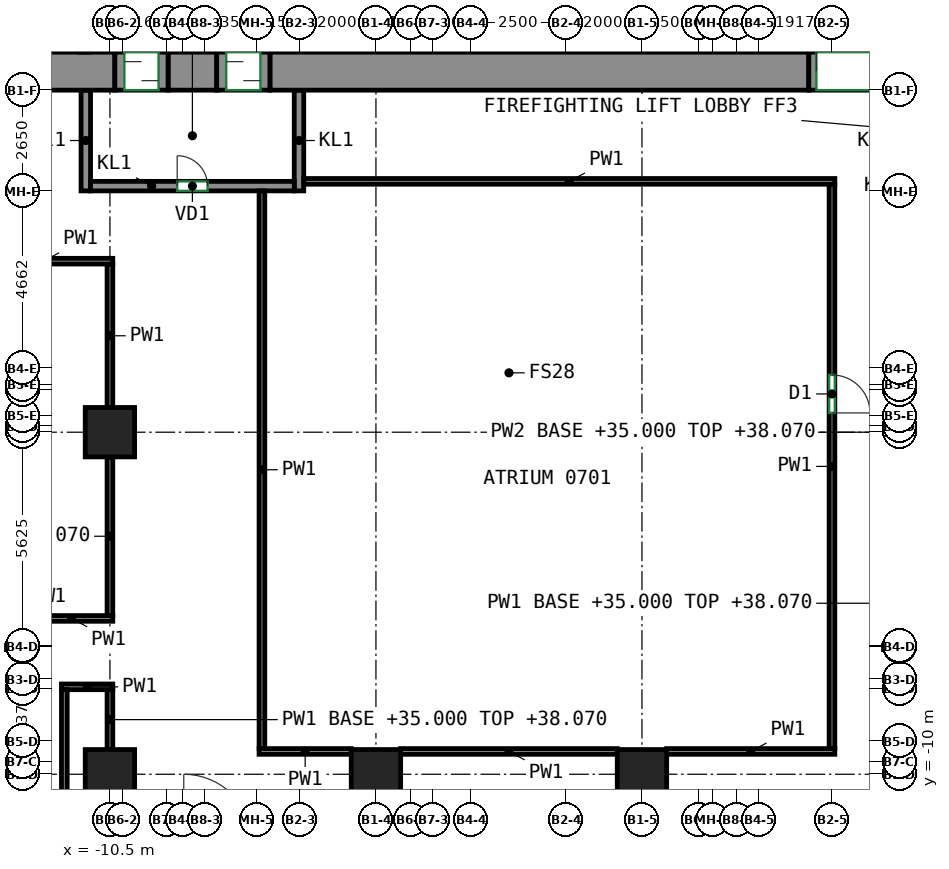
"""IFC4 building model, lengths in metres.
Left out: names, types, materials, properties, quantities, classifications, styles, units other than length and angle.
Written with IfcOpenShell. Run it as: python <this file> out.ifc"""

import sys

from ifc_helpers import new_model, si_unit, direction, frame, frame_2d, origin, origin_2d, place, context, subcontext, project, spatial, rectangle, extrude, source, transform, mapped, element, fill, save


model = new_model("IFC4")
c1 = context("Model", 3, precision=1e-05, world=origin(), true_north=direction((0.0, 1.0)))
c2 = subcontext(c1, "Body", "Model", "MODEL_VIEW")
j1 = project(units=[si_unit("LENGTHUNIT", "METRE"), si_unit("PLANEANGLEUNIT", "RADIAN")], contexts=[c1])
p1 = place(None, origin())
s1 = spatial("IfcSite", under=j1, at=p1, CompositionType="ELEMENT")
p2 = place(p1, origin())
s2 = spatial("IfcBuilding", under=s1, at=p2, CompositionType="ELEMENT")
p3 = place(p2, frame((0.0, 0.0, 35.0)))
s3 = spatial("IfcBuildingStorey", under=s2, at=p3, CompositionType="ELEMENT", Elevation=35.0)
m1 = source(origin(), c2, "Body", "SweptSolid", [
    extrude(rectangle(XDim=1.3, YDim=1.3, at=origin_2d()), origin(), (0.0, 0.0, 1.0), 3.72),
])
for number, where, z_axis, x_axis in (
    (1, (-10.5, -10.0, 0.0), (0.0, 0.0, 1.0), (1.0, 0.0, 0.0)),
    (2, (-10.5, -1.0, 0.0), (0.0, 0.0, 1.0), (1.0, 0.0, 0.0)),
    (3, (-3.5, -10.0, 0.0), (0.0, 0.0, 1.0), (1.0, 0.0, 0.0)),
    (4, (3.5, -10.0, 0.0), (0.0, 0.0, 1.0), (1.0, 0.0, 0.0)),
):
    element("IfcColumn", number, at=place(p3, frame(where, z_axis=z_axis, x_axis=x_axis)), inside=s3, PredefinedType="COLUMN", context=c2, shape_type="MappedRepresentation", body=[
        mapped(m1, transform((0.0, 0.0, 0.0))),
    ])
m2 = source(origin(), c2, "Body", "SweptSolid", [
    extrude(rectangle(XDim=5.63, YDim=1.0, at=frame_2d((2.815, 0.0))), origin(), (0.0, 0.0, 1.0), 3.72),
])
p4 = place(p3, frame((-16.0, 8.5, 0.0), z_axis=(0.0, 0.0, 1.0), x_axis=(1.0, 0.0, 0.0)))
e5 = element("IfcWall", 5, at=p4, inside=s3, PredefinedType="SHEAR", context=c2, shape_type="MappedRepresentation", body=[
    mapped(m2, transform((0.0, 0.0, 0.0))),
])
p5 = place(p4, frame((2.25, 0.0, 0.0)))
e6 = element("IfcOpeningElement", 6, at=p5, cuts=e5, PredefinedType="OPENING", context=c2, shape_type="SweptSolid", body=[
    extrude(rectangle(XDim=1.2, YDim=2.1, at=frame_2d((0.6, 1.05))), frame((0.0, 0.51, 0.0), z_axis=(0.0, -1.0, 0.0), x_axis=(1.0, 0.0, 0.0)), (0.0, 0.0, 1.0), 1.02),
])
m3 = source(origin(), c2, "Body", "SweptSolid", [
    extrude(rectangle(XDim=1.28, YDim=1.0, at=frame_2d((0.64, 0.0))), origin(), (0.0, 0.0, 1.0), 3.72),
])
p6 = place(p3, frame((-8.97, 8.5, 0.0), z_axis=(0.0, 0.0, 1.0), x_axis=(1.0, 0.0, 0.0)))
e7 = element("IfcWall", 7, at=p6, inside=s3, PredefinedType="SHEAR", context=c2, shape_type="MappedRepresentation", body=[
    mapped(m3, transform((0.0, 0.0, 0.0))),
])
m4 = source(origin(), c2, "Body", "SweptSolid", [
    extrude(rectangle(XDim=14.18, YDim=1.0, at=frame_2d((7.09, 0.0))), origin(), (0.0, 0.0, 1.0), 3.72),
])
p7 = place(p3, frame((-6.29, 8.5, 0.0), z_axis=(0.0, 0.0, 1.0), x_axis=(1.0, 0.0, 0.0)))
e8 = element("IfcWall", 8, at=p7, inside=s3, PredefinedType="SHEAR", context=c2, shape_type="MappedRepresentation", body=[
    mapped(m4, transform((0.0, 0.0, 0.0))),
])
m5 = source(origin(), c2, "Body", "SweptSolid", [
    extrude(rectangle(XDim=2.65, YDim=0.25, at=frame_2d((1.325, 0.0))), origin(), (0.0, 0.0, 1.0), 3.72),
])
for number, where, z_axis, x_axis in (
    (9, (-11.135, 5.35, 0.0), (0.0, 0.0, 1.0), (0.0, 1.0, 0.0)),
    (10, (-5.525, 5.35, 0.0), (0.0, 0.0, 1.0), (0.0, 1.0, 0.0)),
):
    element("IfcWall", number, at=place(p3, frame(where, z_axis=z_axis, x_axis=x_axis)), inside=s3, PredefinedType="PARTITIONING", context=c2, shape_type="MappedRepresentation", body=[
        mapped(m5, transform((0.0, 0.0, 0.0))),
    ])
m6 = source(origin(), c2, "Body", "SweptSolid", [
    extrude(rectangle(XDim=5.36, YDim=0.25, at=frame_2d((2.68, 0.0))), origin(), (0.0, 0.0, 1.0), 3.72),
])
p8 = place(p3, frame((-11.01, 5.475, 0.0), z_axis=(0.0, 0.0, 1.0), x_axis=(1.0, 0.0, 0.0)))
e11 = element("IfcWall", 11, at=p8, inside=s3, PredefinedType="PARTITIONING", context=c2, shape_type="MappedRepresentation", body=[
    mapped(m6, transform((0.0, 0.0, 0.0))),
])
p9 = place(p8, frame((2.28, 0.0, 0.0)))
e12 = element("IfcOpeningElement", 12, at=p9, cuts=e11, PredefinedType="OPENING", context=c2, shape_type="SweptSolid", body=[
    extrude(rectangle(XDim=0.8, YDim=2.0, at=frame_2d((0.4, 1.0))), frame((0.0, 0.135, 0.0), z_axis=(0.0, -1.0, 0.0), x_axis=(1.0, 0.0, 0.0)), (0.0, 0.0, 1.0), 0.27),
])
m7 = source(origin(), c2, "Body", "SweptSolid", [
    extrude(rectangle(XDim=1.4, YDim=1.0, at=frame_2d((0.7, 0.0))), origin(), (0.0, 0.0, 1.0), 2.7),
])
p10 = place(p3, frame((-10.37, 8.5, 0.0), z_axis=(0.0, 0.0, 1.0), x_axis=(1.0, 0.0, 0.0)))
e13 = element("IfcWall", 13, at=p10, inside=s3, PredefinedType="PARTITIONING", context=c2, shape_type="MappedRepresentation", body=[
    mapped(m7, transform((0.0, 0.0, 0.0))),
])
p11 = place(p10, frame((0.25, 0.0, 0.0)))
e14 = element("IfcOpeningElement", 14, at=p11, cuts=e13, PredefinedType="OPENING", context=c2, shape_type="SweptSolid", body=[
    extrude(rectangle(XDim=0.9, YDim=2.1, at=frame_2d((0.45, 1.05))), frame((0.0, 0.51, 0.0), z_axis=(0.0, -1.0, 0.0), x_axis=(1.0, 0.0, 0.0)), (0.0, 0.0, 1.0), 1.02),
])
m8 = source(origin(), c2, "Body", "SweptSolid", [
    extrude(rectangle(XDim=1.4, YDim=1.0, at=frame_2d((0.7, 0.0))), origin(), (0.0, 0.0, 1.0), 2.7),
])
p12 = place(p3, frame((-7.69, 8.5, 0.0), z_axis=(0.0, 0.0, 1.0), x_axis=(1.0, 0.0, 0.0)))
e15 = element("IfcWall", 15, at=p12, inside=s3, PredefinedType="PARTITIONING", context=c2, shape_type="MappedRepresentation", body=[
    mapped(m8, transform((0.0, 0.0, 0.0))),
])
p13 = place(p12, frame((0.25, 0.0, 0.0)))
e16 = element("IfcOpeningElement", 16, at=p13, cuts=e15, PredefinedType="OPENING", context=c2, shape_type="SweptSolid", body=[
    extrude(rectangle(XDim=0.9, YDim=2.1, at=frame_2d((0.45, 1.05))), frame((0.0, 0.51, 0.0), z_axis=(0.0, -1.0, 0.0), x_axis=(1.0, 0.0, 0.0)), (0.0, 0.0, 1.0), 1.02),
])
m9 = source(origin(), c2, "Body", "SweptSolid", [
    extrude(rectangle(XDim=2.4, YDim=1.0, at=frame_2d((1.2, 0.0))), origin(), (0.0, 0.0, 1.0), 2.7),
])
p14 = place(p3, frame((7.89, 8.5, 0.0), z_axis=(0.0, 0.0, 1.0), x_axis=(1.0, 0.0, 0.0)))
e17 = element("IfcWall", 17, at=p14, inside=s3, PredefinedType="PARTITIONING", context=c2, shape_type="MappedRepresentation", body=[
    mapped(m9, transform((0.0, 0.0, 0.0))),
])
p15 = place(p14, frame((0.2, 0.0, 0.0)))
e18 = element("IfcOpeningElement", 18, at=p15, cuts=e17, PredefinedType="OPENING", context=c2, shape_type="SweptSolid", body=[
    extrude(rectangle(XDim=2.0, YDim=2.1, at=frame_2d((1.0, 1.05))), frame((0.0, 0.51, 0.0), z_axis=(0.0, -1.0, 0.0), x_axis=(1.0, 0.0, 0.0)), (0.0, 0.0, 1.0), 1.02),
])
p16 = place(p3, frame((-10.425, -5.9, 0.0), z_axis=(0.0, 0.0, 1.0), x_axis=(-1.0, 0.0, 0.0)))
e19 = element("IfcWall", 19, at=p16, inside=s3, PredefinedType="PARTITIONING", context=c2, shape_type="SweptSolid", body=[
    extrude(rectangle(XDim=2.173, YDim=0.15, at=frame_2d((1.086, 0.0))), origin(), (0.0, 0.0, 1.0), 3.72),
])
p17 = place(p3, frame((-10.5, -5.825, 0.0), z_axis=(0.0, 0.0, 1.0), x_axis=(0.0, 1.0, 0.0)))
e20 = element("IfcWall", 20, at=p17, inside=s3, PredefinedType="PARTITIONING", context=c2, shape_type="SweptSolid", body=[
    extrude(rectangle(XDim=4.175, YDim=0.15, at=frame_2d((2.087, 0.0))), origin(), (0.0, 0.0, 1.0), 3.07),
])
p18 = place(p3, frame((-10.5, -0.35, 0.0), z_axis=(0.0, 0.0, 1.0), x_axis=(0.0, 1.0, 0.0)))
e21 = element("IfcWall", 21, at=p18, inside=s3, PredefinedType="PARTITIONING", context=c2, shape_type="SweptSolid", body=[
    extrude(rectangle(XDim=3.775, YDim=0.15, at=frame_2d((1.888, 0.0))), origin(), (0.0, 0.0, 1.0), 3.72),
])
p19 = place(p3, frame((-14.075, 3.5, 0.0), z_axis=(0.0, 0.0, 1.0), x_axis=(1.0, 0.0, 0.0)))
e22 = element("IfcWall", 22, at=p19, inside=s3, PredefinedType="PARTITIONING", context=c2, shape_type="SweptSolid", body=[
    extrude(rectangle(XDim=3.65, YDim=0.15, at=frame_2d((1.825, 0.0))), origin(), (0.0, 0.0, 1.0), 3.72),
])
p20 = place(p3, frame((-10.5, -9.35, 0.0), z_axis=(0.0, 0.0, 1.0), x_axis=(0.0, 1.0, 0.0)))
e23 = element("IfcWall", 23, at=p20, inside=s3, PredefinedType="PARTITIONING", context=c2, shape_type="SweptSolid", body=[
    extrude(rectangle(XDim=1.575, YDim=0.15, at=frame_2d((0.788, 0.0))), origin(), (0.0, 0.0, 1.0), 3.07),
])
p21 = place(p3, frame((-11.775, -7.7, 0.0), z_axis=(0.0, 0.0, 1.0), x_axis=(1.0, 0.0, 0.0)))
e24 = element("IfcWall", 24, at=p21, inside=s3, PredefinedType="PARTITIONING", context=c2, shape_type="SweptSolid", body=[
    extrude(rectangle(XDim=1.35, YDim=0.15, at=frame_2d((0.675, 0.0))), origin(), (0.0, 0.0, 1.0), 3.72),
])
p22 = place(p3, frame((-11.7, -16.648, 0.0), z_axis=(0.0, 0.0, 1.0), x_axis=(0.0, 1.0, 0.0)))
e25 = element("IfcWall", 25, at=p22, inside=s3, PredefinedType="PARTITIONING", context=c2, shape_type="SweptSolid", body=[
    extrude(rectangle(XDim=8.873, YDim=0.15, at=frame_2d((4.437, 0.0))), origin(), (0.0, 0.0, 1.0), 3.72),
])
p23 = place(p3, frame((-6.5, -9.325, 0.0), z_axis=(0.0, 0.0, 1.0), x_axis=(0.0, 1.0, 0.0)))
e26 = element("IfcWall", 26, at=p23, inside=s3, PredefinedType="PARTITIONING", context=c2, shape_type="SweptSolid", body=[
    extrude(rectangle(XDim=14.675, YDim=0.15, at=frame_2d((7.337, 0.0))), origin(), (0.0, 0.0, 1.0), 3.72),
])
p24 = place(p3, frame((-6.575, -9.4, 0.0), z_axis=(0.0, 0.0, 1.0), x_axis=(1.0, 0.0, 0.0)))
e27 = element("IfcWall", 27, at=p24, inside=s3, PredefinedType="PARTITIONING", context=c2, shape_type="SweptSolid", body=[
    extrude(rectangle(XDim=2.425, YDim=0.15, at=frame_2d((1.212, 0.0))), origin(), (0.0, 0.0, 1.0), 3.72),
])
p25 = place(p3, frame((-2.85, -9.4, 0.0), z_axis=(0.0, 0.0, 1.0), x_axis=(1.0, 0.0, 0.0)))
e28 = element("IfcWall", 28, at=p25, inside=s3, PredefinedType="PARTITIONING", context=c2, shape_type="SweptSolid", body=[
    extrude(rectangle(XDim=5.7, YDim=0.15, at=frame_2d((2.85, 0.0))), origin(), (0.0, 0.0, 1.0), 3.72),
])
p26 = place(p3, frame((4.15, -9.4, 0.0), z_axis=(0.0, 0.0, 1.0), x_axis=(1.0, 0.0, 0.0)))
e29 = element("IfcWall", 29, at=p26, inside=s3, PredefinedType="PARTITIONING", context=c2, shape_type="SweptSolid", body=[
    extrude(rectangle(XDim=4.425, YDim=0.15, at=frame_2d((2.212, 0.0))), origin(), (0.0, 0.0, 1.0), 3.72),
])
p27 = place(p3, frame((8.5, 5.525, 0.0), z_axis=(0.0, 0.0, 1.0), x_axis=(0.0, -1.0, 0.0)))
e30 = element("IfcWall", 30, at=p27, inside=s3, PredefinedType="PARTITIONING", context=c2, shape_type="SweptSolid", body=[
    extrude(rectangle(XDim=14.85, YDim=0.15, at=frame_2d((7.425, 0.0))), origin(), (0.0, 0.0, 1.0), 3.72),
])
p28 = place(p27, frame((5.018, 0.0, 0.0)))
e31 = element("IfcOpeningElement", 31, at=p28, cuts=e30, PredefinedType="OPENING", context=c2, shape_type="SweptSolid", body=[
    extrude(rectangle(XDim=1.0, YDim=2.1, at=frame_2d((0.5, 1.05))), frame((0.0, 0.085, 0.0), z_axis=(0.0, -1.0, 0.0), x_axis=(1.0, 0.0, 0.0)), (0.0, 0.0, 1.0), 0.17),
])
p29 = place(p3, frame((-5.4, 5.6, 0.0), z_axis=(0.0, 0.0, 1.0), x_axis=(1.0, 0.0, 0.0)))
e32 = element("IfcWall", 32, at=p29, inside=s3, PredefinedType="PARTITIONING", context=c2, shape_type="SweptSolid", body=[
    extrude(rectangle(XDim=13.975, YDim=0.15, at=frame_2d((6.987, 0.0))), origin(), (0.0, 0.0, 1.0), 3.72),
])
p30 = place(p15, origin())
e33 = element("IfcDoor", 33, at=p30, inside=s3, OperationType="DOUBLE_DOOR_SINGLE_SWING", PredefinedType="DOOR", context=c2, shape_type="SweptSolid", body=[
    extrude(rectangle(XDim=2.0, YDim=2.1, at=frame_2d((1.0, 1.05))), frame((0.0, 0.405, 0.0), z_axis=(0.0, -1.0, 0.0), x_axis=(1.0, 0.0, 0.0)), (0.0, 0.0, 1.0), 0.05),
])
fill(e18, e33)
p31 = place(p9, origin())
e34 = element("IfcDoor", 34, at=p31, inside=s3, OperationType="SINGLE_SWING_LEFT", PredefinedType="DOOR", context=c2, shape_type="SweptSolid", body=[
    extrude(rectangle(XDim=0.8, YDim=2.0, at=frame_2d((0.4, 1.0))), frame((0.0, 0.025, 0.0), z_axis=(0.0, -1.0, 0.0), x_axis=(1.0, 0.0, 0.0)), (0.0, 0.0, 1.0), 0.05),
])
fill(e12, e34)
p32 = place(p11, origin())
e35 = element("IfcDoor", 35, at=p32, inside=s3, OperationType="SLIDING_TO_LEFT", PredefinedType="DOOR", context=c2, shape_type="SweptSolid", body=[
    extrude(rectangle(XDim=0.9, YDim=2.1, at=frame_2d((0.45, 1.05))), frame((0.0, 0.405, 0.0), z_axis=(0.0, -1.0, 0.0), x_axis=(1.0, 0.0, 0.0)), (0.0, 0.0, 1.0), 0.05),
])
fill(e14, e35)
p33 = place(p13, origin())
e36 = element("IfcDoor", 36, at=p33, inside=s3, OperationType="SLIDING_TO_RIGHT", PredefinedType="DOOR", context=c2, shape_type="SweptSolid", body=[
    extrude(rectangle(XDim=0.9, YDim=2.1, at=frame_2d((0.45, 1.05))), frame((0.0, 0.405, 0.0), z_axis=(0.0, -1.0, 0.0), x_axis=(1.0, 0.0, 0.0)), (0.0, 0.0, 1.0), 0.05),
])
fill(e16, e36)
p34 = place(p28, origin())
e37 = element("IfcDoor", 37, at=p34, inside=s3, OperationType="SINGLE_SWING_RIGHT", PredefinedType="DOOR", context=c2, shape_type="SweptSolid", body=[
    extrude(rectangle(XDim=1.0, YDim=2.1, at=frame_2d((0.5, 1.05))), frame((0.0, 0.025, 0.0), z_axis=(0.0, -1.0, 0.0), x_axis=(1.0, 0.0, 0.0)), (0.0, 0.0, 1.0), 0.05),
])
fill(e31, e37)
save(model, sys.argv[1])
